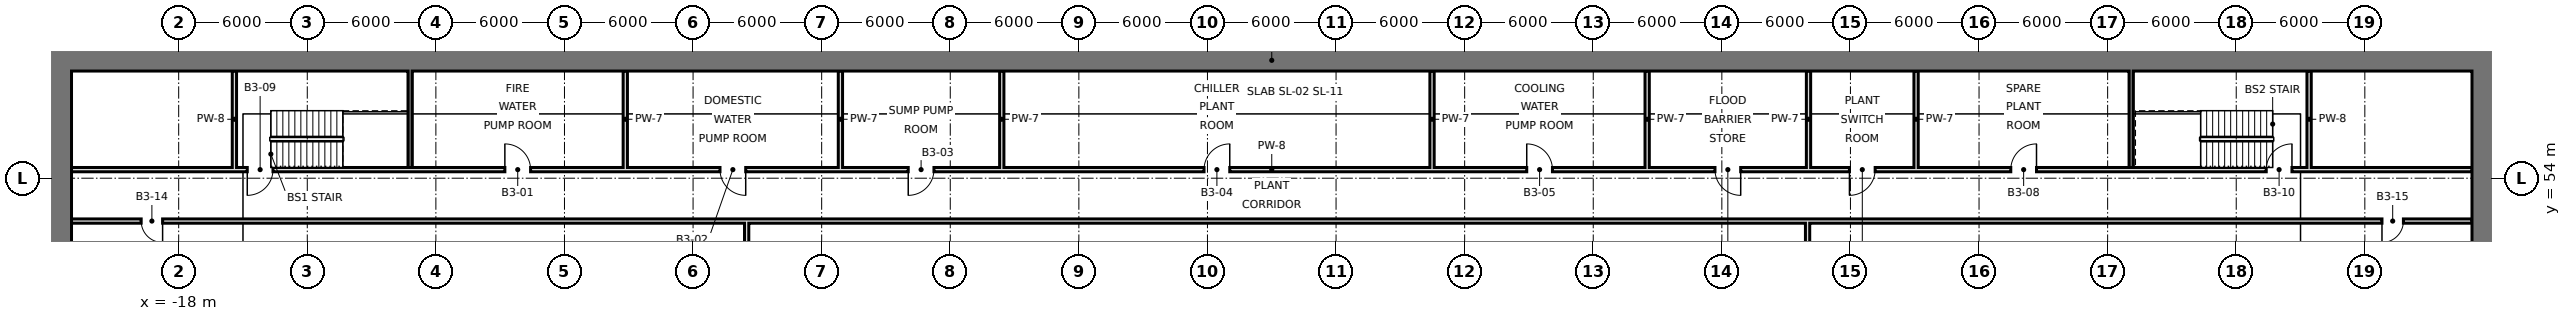
"""IFC4 building model, lengths in metres.
Left out: names, types, materials, properties, quantities, classifications, styles, units other than length and angle.
Written with IfcOpenShell. Run it as: python <this file> out.ifc"""

import sys

from ifc_helpers import new_model, si_unit, direction, frame, frame_2d, origin, place, context, subcontext, project, spatial, rectangle, extrude, element, fill, save


model = new_model("IFC4")
c1 = context("Model", 3, precision=1e-05, world=origin(), true_north=direction((0.0, 1.0)))
c2 = subcontext(c1, "Body", "Model", "MODEL_VIEW")
j1 = project(units=[si_unit("LENGTHUNIT", "METRE"), si_unit("PLANEANGLEUNIT", "RADIAN")], contexts=[c1])
p1 = place(None, origin())
s1 = spatial("IfcSite", under=j1, at=p1, CompositionType="ELEMENT")
p2 = place(p1, origin())
s2 = spatial("IfcBuilding", under=s1, at=p2, CompositionType="ELEMENT")
p3 = place(p2, frame((0.0, 0.0, -13.5)))
s3 = spatial("IfcBuildingStorey", under=s2, at=p3, CompositionType="ELEMENT", Elevation=-13.5)
for number, where, z_axis, x_axis in (
    (1, (-23.5, -12.0, -26.5), (0.0, 0.0, 1.0), (0.0, 1.0, 0.0)),
    (2, (89.5, -12.0, -26.5), (0.0, 0.0, 1.0), (0.0, 1.0, 0.0)),
):
    element("IfcWall", number, at=place(p3, frame(where, z_axis=z_axis, x_axis=x_axis)), inside=s3, PredefinedType="SOLIDWALL", context=c2, shape_type="SweptSolid", body=[
        extrude(rectangle(XDim=72.0, YDim=1.0, at=frame_2d((36.0, 0.0))), origin(), (0.0, 0.0, 1.0), 39.64),
    ])
p4 = place(p3, frame((-23.0, 59.5, -26.5), z_axis=(0.0, 0.0, 1.0), x_axis=(1.0, 0.0, 0.0)))
e3 = element("IfcWall", 3, at=p4, inside=s3, PredefinedType="SOLIDWALL", context=c2, shape_type="SweptSolid", body=[
    extrude(rectangle(XDim=112.0, YDim=1.0, at=frame_2d((56.0, 0.0))), origin(), (0.0, 0.0, 1.0), 39.64),
])
for number, where, z_axis, x_axis in (
    (4, (-15.4, 54.5, 0.0), (0.0, 0.0, 1.0), (0.0, 1.0, 0.0)),
    (5, (-7.2, 54.5, 0.0), (0.0, 0.0, 1.0), (0.0, 1.0, 0.0)),
    (6, (2.837, 54.5, 0.0), (0.0, 0.0, 1.0), (0.0, 1.0, 0.0)),
):
    element("IfcWall", number, at=place(p3, frame(where, z_axis=z_axis, x_axis=x_axis)), inside=s3, PredefinedType="SOLIDWALL", context=c2, shape_type="SweptSolid", body=[
        extrude(rectangle(XDim=4.5, YDim=0.2, at=frame_2d((2.25, 0.0))), origin(), (0.0, 0.0, 1.0), 4.15),
    ])
p5 = place(p3, frame((8.5, 49.6, 0.0), z_axis=(0.0, 0.0, 1.0), x_axis=(0.0, 1.0, 0.0)))
e7 = element("IfcWall", 7, at=p5, inside=s3, PredefinedType="SOLIDWALL", context=c2, shape_type="SweptSolid", body=[
    extrude(rectangle(XDim=2.3, YDim=0.2, at=frame_2d((1.15, 0.0))), origin(), (0.0, 0.0, 1.0), 4.15),
])
for number, where, z_axis, x_axis in (
    (8, (12.875, 54.5, 0.0), (0.0, 0.0, 1.0), (0.0, 1.0, 0.0)),
    (9, (20.403, 54.5, 0.0), (0.0, 0.0, 1.0), (0.0, 1.0, 0.0)),
    (10, (40.478, 54.5, 0.0), (0.0, 0.0, 1.0), (0.0, 1.0, 0.0)),
    (11, (50.516, 54.5, 0.0), (0.0, 0.0, 1.0), (0.0, 1.0, 0.0)),
):
    element("IfcWall", number, at=place(p3, frame(where, z_axis=z_axis, x_axis=x_axis)), inside=s3, PredefinedType="SOLIDWALL", context=c2, shape_type="SweptSolid", body=[
        extrude(rectangle(XDim=4.5, YDim=0.2, at=frame_2d((2.25, 0.0))), origin(), (0.0, 0.0, 1.0), 4.15),
    ])
p6 = place(p3, frame((58.0, -11.0, 0.0), z_axis=(0.0, 0.0, 1.0), x_axis=(0.0, 1.0, 0.0)))
e12 = element("IfcWall", 12, at=p6, inside=s3, PredefinedType="SOLIDWALL", context=c2, shape_type="SweptSolid", body=[
    extrude(rectangle(XDim=62.9, YDim=0.2, at=frame_2d((31.45, 0.0))), origin(), (0.0, 0.0, 1.0), 3.05),
])
p7 = place(p6, frame((0.25, 0.0, 0.0)))
e13 = element("IfcOpeningElement", 13, at=p7, cuts=e12, PredefinedType="OPENING", context=c2, shape_type="SweptSolid", body=[
    extrude(rectangle(XDim=5.3, YDim=2.4, at=frame_2d((2.65, 1.2))), frame((0.0, 0.11, 0.0), z_axis=(0.0, -1.0, 0.0), x_axis=(1.0, 0.0, 0.0)), (0.0, 0.0, 1.0), 0.22),
])
p8 = place(p6, frame((14.25, 0.0, 0.0)))
e14 = element("IfcOpeningElement", 14, at=p8, cuts=e12, PredefinedType="OPENING", context=c2, shape_type="SweptSolid", body=[
    extrude(rectangle(XDim=5.5, YDim=2.4, at=frame_2d((2.75, 1.2))), frame((0.0, 0.11, 0.0), z_axis=(0.0, -1.0, 0.0), x_axis=(1.0, 0.0, 0.0)), (0.0, 0.0, 1.0), 0.22),
])
p9 = place(p6, frame((38.25, 0.0, 0.0)))
e15 = element("IfcOpeningElement", 15, at=p9, cuts=e12, PredefinedType="OPENING", context=c2, shape_type="SweptSolid", body=[
    extrude(rectangle(XDim=5.5, YDim=2.4, at=frame_2d((2.75, 1.2))), frame((0.0, 0.11, 0.0), z_axis=(0.0, -1.0, 0.0), x_axis=(1.0, 0.0, 0.0)), (0.0, 0.0, 1.0), 0.22),
])
p10 = place(p6, frame((50.25, 0.0, 0.0)))
e16 = element("IfcOpeningElement", 16, at=p10, cuts=e12, PredefinedType="OPENING", context=c2, shape_type="SweptSolid", body=[
    extrude(rectangle(XDim=5.5, YDim=2.4, at=frame_2d((2.75, 1.2))), frame((0.0, 0.11, 0.0), z_axis=(0.0, -1.0, 0.0), x_axis=(1.0, 0.0, 0.0)), (0.0, 0.0, 1.0), 0.22),
])
for number, where, z_axis, x_axis in (
    (17, (58.044, 54.5, 0.0), (0.0, 0.0, 1.0), (0.0, 1.0, 0.0)),
    (18, (63.062, 54.5, 0.0), (0.0, 0.0, 1.0), (0.0, 1.0, 0.0)),
    (19, (73.1, 54.5, 0.0), (0.0, 0.0, 1.0), (0.0, 1.0, 0.0)),
    (20, (81.4, 54.5, 0.0), (0.0, 0.0, 1.0), (0.0, 1.0, 0.0)),
):
    element("IfcWall", number, at=place(p3, frame(where, z_axis=z_axis, x_axis=x_axis)), inside=s3, PredefinedType="SOLIDWALL", context=c2, shape_type="SweptSolid", body=[
        extrude(rectangle(XDim=4.5, YDim=0.2, at=frame_2d((2.25, 0.0))), origin(), (0.0, 0.0, 1.0), 4.15),
    ])
p11 = place(p3, frame((-23.0, 52.0, 0.0), z_axis=(0.0, 0.0, 1.0), x_axis=(1.0, 0.0, 0.0)))
e21 = element("IfcWall", 21, at=p11, inside=s3, PredefinedType="SOLIDWALL", context=c2, shape_type="SweptSolid", body=[
    extrude(rectangle(XDim=112.0, YDim=0.2, at=frame_2d((56.0, 0.0))), origin(), (0.0, 0.0, 1.0), 4.15),
])
p12 = place(p11, frame((3.25, 0.0, 0.0)))
e22 = element("IfcOpeningElement", 22, at=p12, cuts=e21, PredefinedType="OPENING", context=c2, shape_type="SweptSolid", body=[
    extrude(rectangle(XDim=1.0, YDim=2.4, at=frame_2d((0.5, 1.2))), frame((0.0, 0.11, 0.0), z_axis=(0.0, -1.0, 0.0), x_axis=(1.0, 0.0, 0.0)), (0.0, 0.0, 1.0), 0.22),
])
p13 = place(p11, frame((107.8, 0.0, 0.0)))
e23 = element("IfcOpeningElement", 23, at=p13, cuts=e21, PredefinedType="OPENING", context=c2, shape_type="SweptSolid", body=[
    extrude(rectangle(XDim=1.0, YDim=2.4, at=frame_2d((0.5, 1.2))), frame((0.0, 0.11, 0.0), z_axis=(0.0, -1.0, 0.0), x_axis=(1.0, 0.0, 0.0)), (0.0, 0.0, 1.0), 0.22),
])
p14 = place(p3, frame((-23.0, 54.4, 0.0), z_axis=(0.0, 0.0, 1.0), x_axis=(1.0, 0.0, 0.0)))
e24 = element("IfcWall", 24, at=p14, inside=s3, PredefinedType="SOLIDWALL", context=c2, shape_type="SweptSolid", body=[
    extrude(rectangle(XDim=112.0, YDim=0.2, at=frame_2d((56.0, 0.0))), origin(), (0.0, 0.0, 1.0), 4.15),
])
p15 = place(p14, frame((20.219, 0.0, 0.0)))
e25 = element("IfcOpeningElement", 25, at=p15, cuts=e24, PredefinedType="OPENING", context=c2, shape_type="SweptSolid", body=[
    extrude(rectangle(XDim=1.2, YDim=2.4, at=frame_2d((0.6, 1.2))), frame((0.0, 0.11, 0.0), z_axis=(0.0, -1.0, 0.0), x_axis=(1.0, 0.0, 0.0)), (0.0, 0.0, 1.0), 0.22),
])
p16 = place(p14, frame((30.256, 0.0, 0.0)))
e26 = element("IfcOpeningElement", 26, at=p16, cuts=e24, PredefinedType="OPENING", context=c2, shape_type="SweptSolid", body=[
    extrude(rectangle(XDim=1.2, YDim=2.4, at=frame_2d((0.6, 1.2))), frame((0.0, 0.11, 0.0), z_axis=(0.0, -1.0, 0.0), x_axis=(1.0, 0.0, 0.0)), (0.0, 0.0, 1.0), 0.22),
])
p17 = place(p14, frame((39.039, 0.0, 0.0)))
e27 = element("IfcOpeningElement", 27, at=p17, cuts=e24, PredefinedType="OPENING", context=c2, shape_type="SweptSolid", body=[
    extrude(rectangle(XDim=1.2, YDim=2.4, at=frame_2d((0.6, 1.2))), frame((0.0, 0.11, 0.0), z_axis=(0.0, -1.0, 0.0), x_axis=(1.0, 0.0, 0.0)), (0.0, 0.0, 1.0), 0.22),
])
p18 = place(p14, frame((52.841, 0.0, 0.0)))
e28 = element("IfcOpeningElement", 28, at=p18, cuts=e24, PredefinedType="OPENING", context=c2, shape_type="SweptSolid", body=[
    extrude(rectangle(XDim=1.2, YDim=2.4, at=frame_2d((0.6, 1.2))), frame((0.0, 0.11, 0.0), z_axis=(0.0, -1.0, 0.0), x_axis=(1.0, 0.0, 0.0)), (0.0, 0.0, 1.0), 0.22),
])
p19 = place(p14, frame((67.897, 0.0, 0.0)))
e29 = element("IfcOpeningElement", 29, at=p19, cuts=e24, PredefinedType="OPENING", context=c2, shape_type="SweptSolid", body=[
    extrude(rectangle(XDim=1.2, YDim=2.4, at=frame_2d((0.6, 1.2))), frame((0.0, 0.11, 0.0), z_axis=(0.0, -1.0, 0.0), x_axis=(1.0, 0.0, 0.0)), (0.0, 0.0, 1.0), 0.22),
])
p20 = place(p14, frame((76.68, 0.0, 0.0)))
e30 = element("IfcOpeningElement", 30, at=p20, cuts=e24, PredefinedType="OPENING", context=c2, shape_type="SweptSolid", body=[
    extrude(rectangle(XDim=1.2, YDim=2.4, at=frame_2d((0.6, 1.2))), frame((0.0, 0.11, 0.0), z_axis=(0.0, -1.0, 0.0), x_axis=(1.0, 0.0, 0.0)), (0.0, 0.0, 1.0), 0.22),
])
p21 = place(p14, frame((82.953, 0.0, 0.0)))
e31 = element("IfcOpeningElement", 31, at=p21, cuts=e24, PredefinedType="OPENING", context=c2, shape_type="SweptSolid", body=[
    extrude(rectangle(XDim=1.2, YDim=2.4, at=frame_2d((0.6, 1.2))), frame((0.0, 0.11, 0.0), z_axis=(0.0, -1.0, 0.0), x_axis=(1.0, 0.0, 0.0)), (0.0, 0.0, 1.0), 0.22),
])
p22 = place(p14, frame((90.481, 0.0, 0.0)))
e32 = element("IfcOpeningElement", 32, at=p22, cuts=e24, PredefinedType="OPENING", context=c2, shape_type="SweptSolid", body=[
    extrude(rectangle(XDim=1.2, YDim=2.4, at=frame_2d((0.6, 1.2))), frame((0.0, 0.11, 0.0), z_axis=(0.0, -1.0, 0.0), x_axis=(1.0, 0.0, 0.0)), (0.0, 0.0, 1.0), 0.22),
])
p23 = place(p14, frame((8.2, 0.0, 0.0)))
e33 = element("IfcOpeningElement", 33, at=p23, cuts=e24, PredefinedType="OPENING", context=c2, shape_type="SweptSolid", body=[
    extrude(rectangle(XDim=1.2, YDim=2.4, at=frame_2d((0.6, 1.2))), frame((0.0, 0.11, 0.0), z_axis=(0.0, -1.0, 0.0), x_axis=(1.0, 0.0, 0.0)), (0.0, 0.0, 1.0), 0.22),
])
p24 = place(p14, frame((102.4, 0.0, 0.0)))
e34 = element("IfcOpeningElement", 34, at=p24, cuts=e24, PredefinedType="OPENING", context=c2, shape_type="SweptSolid", body=[
    extrude(rectangle(XDim=1.2, YDim=2.4, at=frame_2d((0.6, 1.2))), frame((0.0, 0.11, 0.0), z_axis=(0.0, -1.0, 0.0), x_axis=(1.0, 0.0, 0.0)), (0.0, 0.0, 1.0), 0.22),
])
p25 = place(p15, origin())
e35 = element("IfcDoor", 35, at=p25, inside=s3, OperationType="SINGLE_SWING_LEFT", PredefinedType="DOOR", context=c2, shape_type="SweptSolid", body=[
    extrude(rectangle(XDim=1.2, YDim=2.4, at=frame_2d((0.6, 1.2))), frame((0.0, 0.025, 0.0), z_axis=(0.0, -1.0, 0.0), x_axis=(1.0, 0.0, 0.0)), (0.0, 0.0, 1.0), 0.05),
])
fill(e25, e35)
p26 = place(p16, origin())
e36 = element("IfcDoor", 36, at=p26, inside=s3, OperationType="SINGLE_SWING_RIGHT", PredefinedType="DOOR", context=c2, shape_type="SweptSolid", body=[
    extrude(rectangle(XDim=1.2, YDim=2.4, at=frame_2d((0.6, 1.2))), frame((0.0, 0.025, 0.0), z_axis=(0.0, -1.0, 0.0), x_axis=(1.0, 0.0, 0.0)), (0.0, 0.0, 1.0), 0.05),
])
fill(e26, e36)
p27 = place(p17, frame((1.2, 0.0, 0.0), z_axis=(0.0, 0.0, 1.0), x_axis=(-1.0, 0.0, 0.0)))
e37 = element("IfcDoor", 37, at=p27, inside=s3, OperationType="SINGLE_SWING_RIGHT", PredefinedType="DOOR", context=c2, shape_type="SweptSolid", body=[
    extrude(rectangle(XDim=1.2, YDim=2.4, at=frame_2d((0.6, 1.2))), frame((0.0, 0.025, 0.0), z_axis=(0.0, -1.0, 0.0), x_axis=(1.0, 0.0, 0.0)), (0.0, 0.0, 1.0), 0.05),
])
fill(e27, e37)
p28 = place(p18, frame((1.2, 0.0, 0.0), z_axis=(0.0, 0.0, 1.0), x_axis=(-1.0, 0.0, 0.0)))
e38 = element("IfcDoor", 38, at=p28, inside=s3, OperationType="SINGLE_SWING_LEFT", PredefinedType="DOOR", context=c2, shape_type="SweptSolid", body=[
    extrude(rectangle(XDim=1.2, YDim=2.4, at=frame_2d((0.6, 1.2))), frame((0.0, 0.025, 0.0), z_axis=(0.0, -1.0, 0.0), x_axis=(1.0, 0.0, 0.0)), (0.0, 0.0, 1.0), 0.05),
])
fill(e28, e38)
p29 = place(p19, origin())
e39 = element("IfcDoor", 39, at=p29, inside=s3, OperationType="SINGLE_SWING_LEFT", PredefinedType="DOOR", context=c2, shape_type="SweptSolid", body=[
    extrude(rectangle(XDim=1.2, YDim=2.4, at=frame_2d((0.6, 1.2))), frame((0.0, 0.025, 0.0), z_axis=(0.0, -1.0, 0.0), x_axis=(1.0, 0.0, 0.0)), (0.0, 0.0, 1.0), 0.05),
])
fill(e29, e39)
p30 = place(p20, origin())
e40 = element("IfcDoor", 40, at=p30, inside=s3, OperationType="SINGLE_SWING_RIGHT", PredefinedType="DOOR", context=c2, shape_type="SweptSolid", body=[
    extrude(rectangle(XDim=1.2, YDim=2.4, at=frame_2d((0.6, 1.2))), frame((0.0, 0.025, 0.0), z_axis=(0.0, -1.0, 0.0), x_axis=(1.0, 0.0, 0.0)), (0.0, 0.0, 1.0), 0.05),
])
fill(e30, e40)
p31 = place(p21, frame((1.2, 0.0, 0.0), z_axis=(0.0, 0.0, 1.0), x_axis=(-1.0, 0.0, 0.0)))
e41 = element("IfcDoor", 41, at=p31, inside=s3, OperationType="SINGLE_SWING_RIGHT", PredefinedType="DOOR", context=c2, shape_type="SweptSolid", body=[
    extrude(rectangle(XDim=1.2, YDim=2.4, at=frame_2d((0.6, 1.2))), frame((0.0, 0.025, 0.0), z_axis=(0.0, -1.0, 0.0), x_axis=(1.0, 0.0, 0.0)), (0.0, 0.0, 1.0), 0.05),
])
fill(e31, e41)
p32 = place(p22, frame((1.2, 0.0, 0.0), z_axis=(0.0, 0.0, 1.0), x_axis=(-1.0, 0.0, 0.0)))
e42 = element("IfcDoor", 42, at=p32, inside=s3, OperationType="SINGLE_SWING_LEFT", PredefinedType="DOOR", context=c2, shape_type="SweptSolid", body=[
    extrude(rectangle(XDim=1.2, YDim=2.4, at=frame_2d((0.6, 1.2))), frame((0.0, 0.025, 0.0), z_axis=(0.0, -1.0, 0.0), x_axis=(1.0, 0.0, 0.0)), (0.0, 0.0, 1.0), 0.05),
])
fill(e32, e42)
p33 = place(p23, frame((1.2, 0.0, 0.0), z_axis=(0.0, 0.0, 1.0), x_axis=(-1.0, 0.0, 0.0)))
e43 = element("IfcDoor", 43, at=p33, inside=s3, OperationType="SINGLE_SWING_RIGHT", PredefinedType="DOOR", context=c2, shape_type="SweptSolid", body=[
    extrude(rectangle(XDim=1.2, YDim=2.4, at=frame_2d((0.6, 1.2))), frame((0.0, 0.025, 0.0), z_axis=(0.0, -1.0, 0.0), x_axis=(1.0, 0.0, 0.0)), (0.0, 0.0, 1.0), 0.05),
])
fill(e33, e43)
p34 = place(p24, frame((1.2, 0.0, 0.0), z_axis=(0.0, 0.0, 1.0), x_axis=(-1.0, 0.0, 0.0)))
e44 = element("IfcDoor", 44, at=p34, inside=s3, OperationType="SINGLE_SWING_LEFT", PredefinedType="DOOR", context=c2, shape_type="SweptSolid", body=[
    extrude(rectangle(XDim=1.2, YDim=2.4, at=frame_2d((0.6, 1.2))), frame((0.0, 0.025, 0.0), z_axis=(0.0, -1.0, 0.0), x_axis=(1.0, 0.0, 0.0)), (0.0, 0.0, 1.0), 0.05),
])
fill(e34, e44)
p35 = place(p12, origin())
e45 = element("IfcDoor", 45, at=p35, inside=s3, OperationType="SINGLE_SWING_RIGHT", PredefinedType="DOOR", context=c2, shape_type="SweptSolid", body=[
    extrude(rectangle(XDim=1.0, YDim=2.4, at=frame_2d((0.5, 1.2))), frame((0.0, 0.025, 0.0), z_axis=(0.0, -1.0, 0.0), x_axis=(1.0, 0.0, 0.0)), (0.0, 0.0, 1.0), 0.05),
])
fill(e22, e45)
p36 = place(p13, frame((1.0, 0.0, 0.0), z_axis=(0.0, 0.0, 1.0), x_axis=(-1.0, 0.0, 0.0)))
e46 = element("IfcDoor", 46, at=p36, inside=s3, OperationType="SINGLE_SWING_RIGHT", PredefinedType="DOOR", context=c2, shape_type="SweptSolid", body=[
    extrude(rectangle(XDim=1.0, YDim=2.4, at=frame_2d((0.5, 1.2))), frame((0.0, 0.025, 0.0), z_axis=(0.0, -1.0, 0.0), x_axis=(1.0, 0.0, 0.0)), (0.0, 0.0, 1.0), 0.05),
])
fill(e23, e46)
save(model, sys.argv[1])
